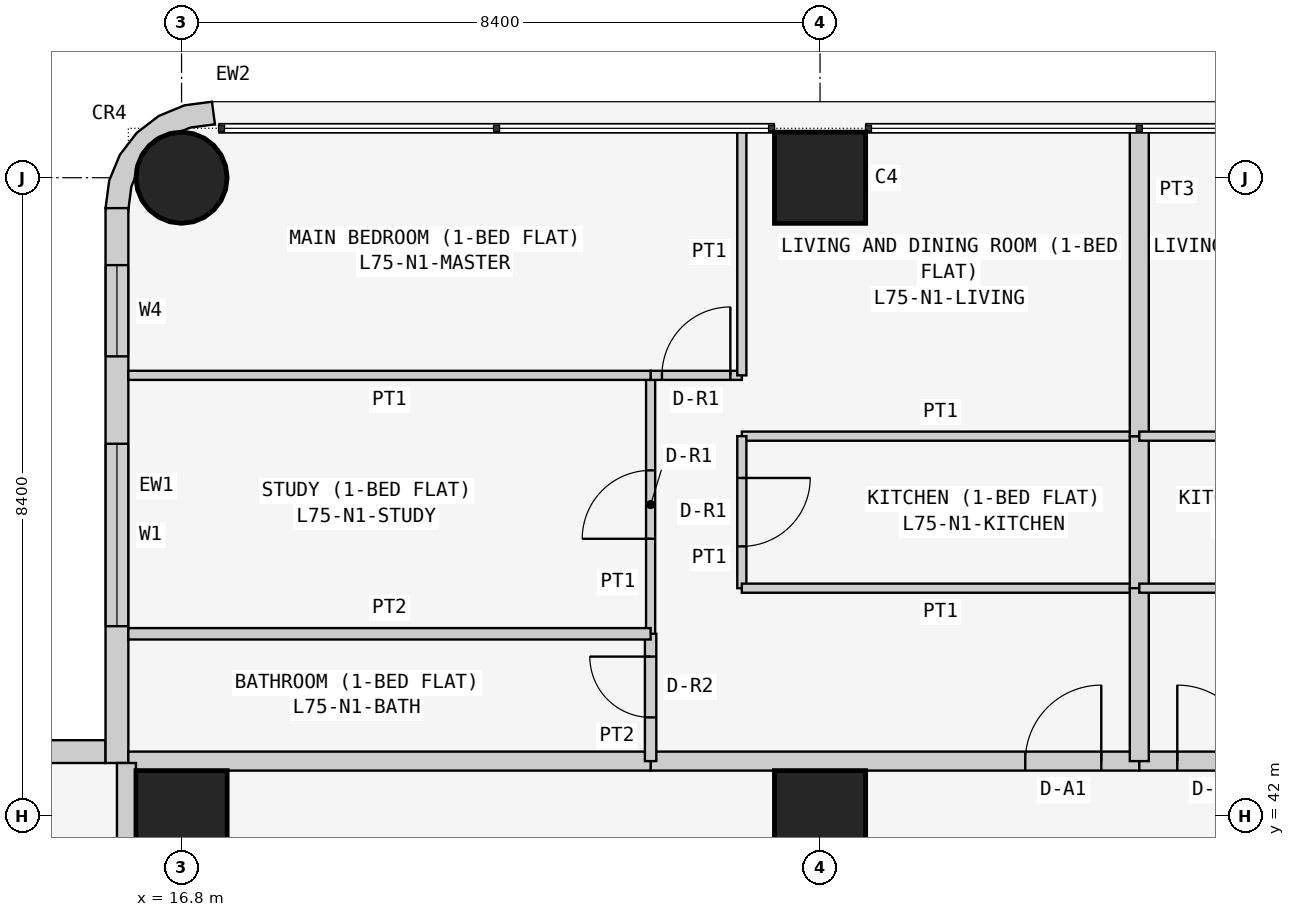
"""IFC4 building model, lengths in metres.
Left out: names, types, materials, properties, quantities, classifications, styles, units other than length and angle.
Written with IfcOpenShell. Run it as: python <this file> out.ifc"""

import sys

from ifc_helpers import new_model, si_unit, direction, frame, frame_2d, origin, origin_2d, place, context, subcontext, project, spatial, polyline, rectangle, circle, outline, extrude, element, fill, save


model = new_model("IFC4")
c1 = context("Model", 3, precision=1e-05, world=origin(), true_north=direction((0.0, 1.0)))
c2 = subcontext(c1, "Body", "Model", "MODEL_VIEW")
j1 = project(units=[si_unit("LENGTHUNIT", "METRE"), si_unit("PLANEANGLEUNIT", "RADIAN")], contexts=[c1])
p1 = place(None, origin())
s1 = spatial("IfcSite", under=j1, at=p1, CompositionType="ELEMENT")
p2 = place(p1, origin())
s2 = spatial("IfcBuilding", under=s1, at=p2, CompositionType="ELEMENT")
p3 = place(p2, frame((0.0, 0.0, 286.5)))
s3 = spatial("IfcBuildingStorey", under=s2, at=p3, CompositionType="ELEMENT", Elevation=286.5)
p4 = place(p3, frame((16.8, 42.0, 0.0), z_axis=(0.0, 0.0, 1.0), x_axis=(1.0, 0.0, 0.0)))
e1 = element("IfcColumn", 1, at=p4, inside=s3, PredefinedType="COLUMN", context=c2, shape_type="SweptSolid", body=[
    extrude(rectangle(XDim=1.2, YDim=1.2, at=origin_2d()), origin(), (0.0, 0.0, 1.0), 3.6),
])
p5 = place(p3, frame((16.8, 50.4, 0.0), z_axis=(0.0, 0.0, 1.0), x_axis=(1.0, 0.0, 0.0)))
e2 = element("IfcColumn", 2, at=p5, inside=s3, PredefinedType="COLUMN", context=c2, shape_type="SweptSolid", body=[
    extrude(circle(Radius=0.6, at=origin_2d()), origin(), (0.0, 0.0, 1.0), 3.6),
])
for number, where, z_axis, x_axis in (
    (3, (25.2, 42.0, 0.0), (0.0, 0.0, 1.0), (1.0, 0.0, 0.0)),
    (4, (25.2, 50.4, 0.0), (0.0, 0.0, 1.0), (1.0, 0.0, 0.0)),
):
    element("IfcColumn", number, at=place(p3, frame(where, z_axis=z_axis, x_axis=x_axis)), inside=s3, PredefinedType="COLUMN", context=c2, shape_type="SweptSolid", body=[
        extrude(rectangle(XDim=1.2, YDim=1.2, at=origin_2d()), origin(), (0.0, 0.0, 1.0), 3.6),
    ])
p6 = place(p3, frame((15.8, 42.85, 0.0), z_axis=(0.0, 0.0, 1.0), x_axis=(-1.0, 0.0, 0.0)))
e5 = element("IfcWall", 5, at=p6, inside=s3, PredefinedType="SOLIDWALL", context=c2, shape_type="SweptSolid", body=[
    extrude(rectangle(XDim=7.0, YDim=0.3, at=frame_2d((3.5, 0.0))), origin(), (0.0, 0.0, 1.0), 3.45),
])
p7 = place(p6, frame((1.5, 0.0, 0.9)))
e6 = element("IfcOpeningElement", 6, at=p7, cuts=e5, PredefinedType="OPENING", context=c2, shape_type="SweptSolid", body=[
    extrude(rectangle(XDim=2.4, YDim=1.5, at=frame_2d((1.2, 0.75))), frame((0.0, 0.16, 0.0), z_axis=(0.0, -1.0, 0.0), x_axis=(1.0, 0.0, 0.0)), (0.0, 0.0, 1.0), 0.32),
])
p8 = place(p6, frame((5.05, 0.0, 0.9)))
e7 = element("IfcOpeningElement", 7, at=p8, cuts=e5, PredefinedType="OPENING", context=c2, shape_type="SweptSolid", body=[
    extrude(rectangle(XDim=1.2, YDim=1.5, at=frame_2d((0.6, 0.75))), frame((0.0, 0.16, 0.0), z_axis=(0.0, -1.0, 0.0), x_axis=(1.0, 0.0, 0.0)), (0.0, 0.0, 1.0), 0.32),
])
p9 = place(p3, frame((15.95, 50.0, 0.0), z_axis=(0.0, 0.0, 1.0), x_axis=(0.0, -1.0, 0.0)))
e8 = element("IfcWall", 8, at=p9, inside=s3, PredefinedType="SOLIDWALL", context=c2, shape_type="SweptSolid", body=[
    extrude(rectangle(XDim=7.3, YDim=0.3, at=frame_2d((3.65, 0.0))), origin(), (0.0, 0.0, 1.0), 3.45),
])
p10 = place(p9, frame((3.1, 0.0, 0.9)))
e9 = element("IfcOpeningElement", 9, at=p10, cuts=e8, PredefinedType="OPENING", context=c2, shape_type="SweptSolid", body=[
    extrude(rectangle(XDim=2.4, YDim=1.5, at=frame_2d((1.2, 0.75))), frame((0.0, 0.16, 0.0), z_axis=(0.0, -1.0, 0.0), x_axis=(1.0, 0.0, 0.0)), (0.0, 0.0, 1.0), 0.32),
])
p11 = place(p9, frame((0.75, 0.0, 0.9)))
e10 = element("IfcOpeningElement", 10, at=p11, cuts=e8, PredefinedType="OPENING", context=c2, shape_type="SweptSolid", body=[
    extrude(rectangle(XDim=1.2, YDim=1.5, at=frame_2d((0.6, 0.75))), frame((0.0, 0.16, 0.0), z_axis=(0.0, -1.0, 0.0), x_axis=(1.0, 0.0, 0.0)), (0.0, 0.0, 1.0), 0.32),
])
p12 = place(p3, frame((17.162, 50.976, 0.0), z_axis=(0.0, 0.0, 1.0), x_axis=(-0.707106781187, 0.707106781187, 0.0)))
e11 = element("IfcWall", 11, at=p12, inside=s3, PredefinedType="SOLIDWALL", context=c2, shape_type="SweptSolid", body=[
    extrude(outline(polyline([(0.047, -0.129), (0.033, -0.143), (0.273, -0.327), (0.495, -0.037), (0.635, 0.301), (0.683, 0.663), (0.635, 1.025), (0.495, 1.363), (0.273, 1.653), (0.033, 1.469), (0.047, 1.455), (0.233, 1.212), (0.292, 1.069), (0.358, 1.003), (0.449, 0.782), (0.449, 0.543), (0.358, 0.322), (0.292, 0.257), (0.233, 0.114), (0.047, -0.129)])), origin(), (0.0, 0.0, 1.0), 3.45),
])
p13 = place(p3, frame((22.971, 42.725, 0.0), z_axis=(0.0, 0.0, 1.0), x_axis=(1.0, 0.0, 0.0)))
e12 = element("IfcWall", 12, at=p13, inside=s3, PredefinedType="PARTITIONING", context=c2, shape_type="SweptSolid", body=[
    extrude(rectangle(XDim=6.429, YDim=0.25, at=frame_2d((3.214, 0.0))), origin(), (0.0, 0.0, 1.0), 3.45),
])
p14 = place(p13, frame((4.929, 0.0, 0.0)))
e13 = element("IfcOpeningElement", 13, at=p14, cuts=e12, PredefinedType="OPENING", context=c2, shape_type="SweptSolid", body=[
    extrude(rectangle(XDim=1.0, YDim=2.1, at=frame_2d((0.5, 1.05))), frame((0.0, 0.135, 0.0), z_axis=(0.0, -1.0, 0.0), x_axis=(1.0, 0.0, 0.0)), (0.0, 0.0, 1.0), 0.27),
])
p15 = place(p3, frame((16.1, 42.725, 0.0), z_axis=(0.0, 0.0, 1.0), x_axis=(1.0, 0.0, 0.0)))
e14 = element("IfcWall", 14, at=p15, inside=s3, PredefinedType="PARTITIONING", context=c2, shape_type="SweptSolid", body=[
    extrude(rectangle(XDim=6.871, YDim=0.25, at=frame_2d((3.436, 0.0))), origin(), (0.0, 0.0, 1.0), 3.45),
])
p16 = place(p3, frame((29.4, 42.725, 0.0), z_axis=(0.0, 0.0, 1.0), x_axis=(1.0, 0.0, 0.0)))
e15 = element("IfcWall", 15, at=p16, inside=s3, PredefinedType="PARTITIONING", context=c2, shape_type="SweptSolid", body=[
    extrude(rectangle(XDim=6.429, YDim=0.25, at=frame_2d((3.215, 0.0))), origin(), (0.0, 0.0, 1.0), 3.45),
])
p17 = place(p16, frame((0.5, 0.0, 0.0)))
e16 = element("IfcOpeningElement", 16, at=p17, cuts=e15, PredefinedType="OPENING", context=c2, shape_type="SweptSolid", body=[
    extrude(rectangle(XDim=1.0, YDim=2.1, at=frame_2d((0.5, 1.05))), frame((0.0, 0.135, 0.0), z_axis=(0.0, -1.0, 0.0), x_axis=(1.0, 0.0, 0.0)), (0.0, 0.0, 1.0), 0.27),
])
p18 = place(p3, frame((16.075, 36.229, 0.0), z_axis=(0.0, 0.0, 1.0), x_axis=(0.0, 1.0, 0.0)))
e17 = element("IfcWall", 17, at=p18, inside=s3, PredefinedType="PARTITIONING", context=c2, shape_type="SweptSolid", body=[
    extrude(rectangle(XDim=6.471, YDim=0.25, at=frame_2d((3.235, 0.0))), origin(), (0.0, 0.0, 1.0), 3.45),
])
p19 = place(p3, frame((29.4, 47.0, 0.0), z_axis=(0.0, 0.0, 1.0), x_axis=(-1.0, 0.0, 0.0)))
e18 = element("IfcWall", 18, at=p19, inside=s3, PredefinedType="PARTITIONING", context=c2, shape_type="SweptSolid", body=[
    extrude(rectangle(XDim=5.229, YDim=0.12, at=frame_2d((2.615, 0.0))), origin(), (0.0, 0.0, 1.0), 3.45),
])
p20 = place(p3, frame((24.171, 47.0, 0.0), z_axis=(0.0, 0.0, 1.0), x_axis=(0.0, -1.0, 0.0)))
e19 = element("IfcWall", 19, at=p20, inside=s3, PredefinedType="PARTITIONING", context=c2, shape_type="SweptSolid", body=[
    extrude(rectangle(XDim=2.0, YDim=0.12, at=frame_2d((1.0, 0.0))), origin(), (0.0, 0.0, 1.0), 3.45),
])
p21 = place(p20, frame((0.55, 0.0, 0.0)))
e20 = element("IfcOpeningElement", 20, at=p21, cuts=e19, PredefinedType="OPENING", context=c2, shape_type="SweptSolid", body=[
    extrude(rectangle(XDim=0.9, YDim=2.1, at=frame_2d((0.45, 1.05))), frame((0.0, 0.07, 0.0), z_axis=(0.0, -1.0, 0.0), x_axis=(1.0, 0.0, 0.0)), (0.0, 0.0, 1.0), 0.14),
])
p22 = place(p3, frame((24.171, 45.0, 0.0), z_axis=(0.0, 0.0, 1.0), x_axis=(1.0, 0.0, 0.0)))
e21 = element("IfcWall", 21, at=p22, inside=s3, PredefinedType="PARTITIONING", context=c2, shape_type="SweptSolid", body=[
    extrude(rectangle(XDim=5.229, YDim=0.12, at=frame_2d((2.615, 0.0))), origin(), (0.0, 0.0, 1.0), 3.45),
])
p23 = place(p3, frame((29.4, 45.0, 0.0), z_axis=(0.0, 0.0, 1.0), x_axis=(0.0, 1.0, 0.0)))
e22 = element("IfcWall", 22, at=p23, inside=s3, PredefinedType="PARTITIONING", context=c2, shape_type="SweptSolid", body=[
    extrude(rectangle(XDim=2.0, YDim=0.25, at=frame_2d((1.0, 0.0))), origin(), (0.0, 0.0, 1.0), 2.848),
])
p24 = place(p3, frame((22.971, 42.725, 0.0), z_axis=(0.0, 0.0, 1.0), x_axis=(0.0, 1.0, 0.0)))
e23 = element("IfcWall", 23, at=p24, inside=s3, PredefinedType="PARTITIONING", context=c2, shape_type="SweptSolid", body=[
    extrude(rectangle(XDim=1.675, YDim=0.15, at=frame_2d((0.837, 0.0))), origin(), (0.0, 0.0, 1.0), 3.45),
])
p25 = place(p24, frame((0.575, 0.0, 0.0)))
e24 = element("IfcOpeningElement", 24, at=p25, cuts=e23, PredefinedType="OPENING", context=c2, shape_type="SweptSolid", body=[
    extrude(rectangle(XDim=0.8, YDim=2.1, at=frame_2d((0.4, 1.05))), frame((0.0, 0.085, 0.0), z_axis=(0.0, -1.0, 0.0), x_axis=(1.0, 0.0, 0.0)), (0.0, 0.0, 1.0), 0.17),
])
p26 = place(p3, frame((22.971, 44.4, 0.0), z_axis=(0.0, 0.0, 1.0), x_axis=(0.0, 1.0, 0.0)))
e25 = element("IfcWall", 25, at=p26, inside=s3, PredefinedType="PARTITIONING", context=c2, shape_type="SweptSolid", body=[
    extrude(rectangle(XDim=3.4, YDim=0.12, at=frame_2d((1.7, 0.0))), origin(), (0.0, 0.0, 1.0), 3.45),
])
p27 = place(p26, frame((1.25, 0.0, 0.0)))
e26 = element("IfcOpeningElement", 26, at=p27, cuts=e25, PredefinedType="OPENING", context=c2, shape_type="SweptSolid", body=[
    extrude(rectangle(XDim=0.9, YDim=2.1, at=frame_2d((0.45, 1.05))), frame((0.0, 0.07, 0.0), z_axis=(0.0, -1.0, 0.0), x_axis=(1.0, 0.0, 0.0)), (0.0, 0.0, 1.0), 0.14),
])
p28 = place(p3, frame((22.971, 47.8, 0.0), z_axis=(0.0, 0.0, 1.0), x_axis=(1.0, 0.0, 0.0)))
e27 = element("IfcWall", 27, at=p28, inside=s3, PredefinedType="PARTITIONING", context=c2, shape_type="SweptSolid", body=[
    extrude(rectangle(XDim=1.2, YDim=0.12, at=frame_2d((0.6, 0.0))), origin(), (0.0, 0.0, 1.0), 3.45),
])
p29 = place(p28, frame((0.149, 0.0, 0.0)))
e28 = element("IfcOpeningElement", 28, at=p29, cuts=e27, PredefinedType="OPENING", context=c2, shape_type="SweptSolid", body=[
    extrude(rectangle(XDim=0.9, YDim=2.1, at=frame_2d((0.45, 1.05))), frame((0.0, 0.07, 0.0), z_axis=(0.0, -1.0, 0.0), x_axis=(1.0, 0.0, 0.0)), (0.0, 0.0, 1.0), 0.14),
])
p30 = place(p3, frame((24.171, 47.8, 0.0), z_axis=(0.0, 0.0, 1.0), x_axis=(0.0, 1.0, 0.0)))
e29 = element("IfcWall", 29, at=p30, inside=s3, PredefinedType="PARTITIONING", context=c2, shape_type="SweptSolid", body=[
    extrude(rectangle(XDim=3.25, YDim=0.12, at=frame_2d((1.625, 0.0))), origin(), (0.0, 0.0, 1.0), 3.45),
])
p31 = place(p3, frame((29.4, 45.0, 0.0), z_axis=(0.0, 0.0, 1.0), x_axis=(0.0, -1.0, 0.0)))
e30 = element("IfcWall", 30, at=p31, inside=s3, PredefinedType="PARTITIONING", context=c2, shape_type="SweptSolid", body=[
    extrude(rectangle(XDim=2.275, YDim=0.25, at=frame_2d((1.137, 0.0))), origin(), (0.0, 0.0, 1.0), 2.848),
])
p32 = place(p3, frame((29.4, 51.05, 0.0), z_axis=(0.0, 0.0, 1.0), x_axis=(0.0, -1.0, 0.0)))
e31 = element("IfcWall", 31, at=p32, inside=s3, PredefinedType="PARTITIONING", context=c2, shape_type="SweptSolid", body=[
    extrude(rectangle(XDim=4.05, YDim=0.25, at=frame_2d((2.025, 0.0))), origin(), (0.0, 0.0, 1.0), 2.848),
])
p33 = place(p3, frame((22.971, 44.4, 0.0), z_axis=(0.0, 0.0, 1.0), x_axis=(-1.0, 0.0, 0.0)))
e32 = element("IfcWall", 32, at=p33, inside=s3, PredefinedType="PARTITIONING", context=c2, shape_type="SweptSolid", body=[
    extrude(rectangle(XDim=6.871, YDim=0.15, at=frame_2d((3.436, 0.0))), origin(), (0.0, 0.0, 1.0), 3.45),
])
p34 = place(p3, frame((22.971, 47.8, 0.0), z_axis=(0.0, 0.0, 1.0), x_axis=(-1.0, 0.0, 0.0)))
e33 = element("IfcWall", 33, at=p34, inside=s3, PredefinedType="PARTITIONING", context=c2, shape_type="SweptSolid", body=[
    extrude(rectangle(XDim=6.871, YDim=0.12, at=frame_2d((3.436, 0.0))), origin(), (0.0, 0.0, 1.0), 3.45),
])
for number, where, z_axis, x_axis in (
    (34, (29.4, 47.0, 0.0), (0.0, 0.0, 1.0), (1.0, 0.0, 0.0)),
    (35, (34.629, 45.0, 0.0), (0.0, 0.0, 1.0), (-1.0, 0.0, 0.0)),
):
    element("IfcWall", number, at=place(p3, frame(where, z_axis=z_axis, x_axis=x_axis)), inside=s3, PredefinedType="PARTITIONING", context=c2, shape_type="SweptSolid", body=[
        extrude(rectangle(XDim=5.229, YDim=0.12, at=frame_2d((2.615, 0.0))), origin(), (0.0, 0.0, 1.0), 3.45),
    ])
p35 = place(p10, origin())
e36 = element("IfcWindow", 36, at=p35, inside=s3, PartitioningType="SINGLE_PANEL", PredefinedType="WINDOW", context=c2, shape_type="SweptSolid", body=[
    extrude(rectangle(XDim=2.4, YDim=1.5, at=frame_2d((1.2, 0.75))), frame((0.0, 0.03, 0.0), z_axis=(0.0, -1.0, 0.0), x_axis=(1.0, 0.0, 0.0)), (0.0, 0.0, 1.0), 0.06),
])
fill(e9, e36)
p36 = place(p11, origin())
e37 = element("IfcWindow", 37, at=p36, inside=s3, PartitioningType="SINGLE_PANEL", PredefinedType="WINDOW", context=c2, shape_type="SweptSolid", body=[
    extrude(rectangle(XDim=1.2, YDim=1.5, at=frame_2d((0.6, 0.75))), frame((0.0, 0.03, 0.0), z_axis=(0.0, -1.0, 0.0), x_axis=(1.0, 0.0, 0.0)), (0.0, 0.0, 1.0), 0.06),
])
fill(e10, e37)
p37 = place(p14, origin())
e38 = element("IfcDoor", 38, at=p37, inside=s3, OperationType="SINGLE_SWING_RIGHT", PredefinedType="DOOR", context=c2, shape_type="SweptSolid", body=[
    extrude(rectangle(XDim=1.0, YDim=2.1, at=frame_2d((0.5, 1.05))), frame((0.0, 0.025, 0.0), z_axis=(0.0, -1.0, 0.0), x_axis=(1.0, 0.0, 0.0)), (0.0, 0.0, 1.0), 0.05),
])
fill(e13, e38)
p38 = place(p21, origin())
e39 = element("IfcDoor", 39, at=p38, inside=s3, OperationType="SINGLE_SWING_LEFT", PredefinedType="DOOR", context=c2, shape_type="SweptSolid", body=[
    extrude(rectangle(XDim=0.9, YDim=2.1, at=frame_2d((0.45, 1.05))), frame((0.0, 0.025, 0.0), z_axis=(0.0, -1.0, 0.0), x_axis=(1.0, 0.0, 0.0)), (0.0, 0.0, 1.0), 0.05),
])
fill(e20, e39)
p39 = place(p25, origin())
e40 = element("IfcDoor", 40, at=p39, inside=s3, OperationType="SINGLE_SWING_RIGHT", PredefinedType="DOOR", context=c2, shape_type="SweptSolid", body=[
    extrude(rectangle(XDim=0.8, YDim=2.1, at=frame_2d((0.4, 1.05))), frame((0.0, 0.025, 0.0), z_axis=(0.0, -1.0, 0.0), x_axis=(1.0, 0.0, 0.0)), (0.0, 0.0, 1.0), 0.05),
])
fill(e24, e40)
p40 = place(p27, origin())
e41 = element("IfcDoor", 41, at=p40, inside=s3, OperationType="SINGLE_SWING_LEFT", PredefinedType="DOOR", context=c2, shape_type="SweptSolid", body=[
    extrude(rectangle(XDim=0.9, YDim=2.1, at=frame_2d((0.45, 1.05))), frame((0.0, 0.025, 0.0), z_axis=(0.0, -1.0, 0.0), x_axis=(1.0, 0.0, 0.0)), (0.0, 0.0, 1.0), 0.05),
])
fill(e26, e41)
p41 = place(p29, origin())
e42 = element("IfcDoor", 42, at=p41, inside=s3, OperationType="SINGLE_SWING_RIGHT", PredefinedType="DOOR", context=c2, shape_type="SweptSolid", body=[
    extrude(rectangle(XDim=0.9, YDim=2.1, at=frame_2d((0.45, 1.05))), frame((0.0, 0.025, 0.0), z_axis=(0.0, -1.0, 0.0), x_axis=(1.0, 0.0, 0.0)), (0.0, 0.0, 1.0), 0.05),
])
fill(e28, e42)
p42 = place(p17, origin())
e43 = element("IfcDoor", 43, at=p42, inside=s3, OperationType="SINGLE_SWING_LEFT", PredefinedType="DOOR", context=c2, shape_type="SweptSolid", body=[
    extrude(rectangle(XDim=1.0, YDim=2.1, at=frame_2d((0.5, 1.05))), frame((0.0, 0.025, 0.0), z_axis=(0.0, -1.0, 0.0), x_axis=(1.0, 0.0, 0.0)), (0.0, 0.0, 1.0), 0.05),
])
fill(e16, e43)
save(model, sys.argv[1])
